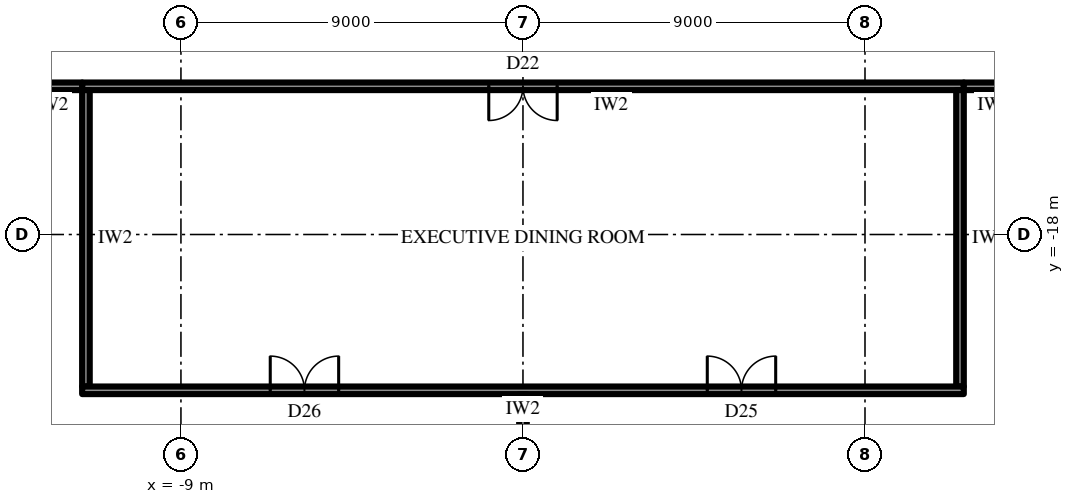
"""IFC4 building model, lengths in metres.
Left out: names, types, materials, properties, quantities, classifications, styles, units other than length and angle.
Written with IfcOpenShell. Run it as: python <this file> out.ifc"""

import sys

from ifc_helpers import new_model, si_unit, direction, frame, frame_2d, origin, place, context, subcontext, project, spatial, rectangle, extrude, element, fill, save


model = new_model("IFC4")
c1 = context("Model", 3, precision=1e-05, world=origin(), true_north=direction((0.0, 1.0)))
c2 = subcontext(c1, "Body", "Model", "MODEL_VIEW")
j1 = project(units=[si_unit("LENGTHUNIT", "METRE"), si_unit("PLANEANGLEUNIT", "RADIAN")], contexts=[c1])
p1 = place(None, origin())
s1 = spatial("IfcSite", under=j1, at=p1, CompositionType="ELEMENT")
p2 = place(p1, origin())
s2 = spatial("IfcBuilding", under=s1, at=p2, CompositionType="ELEMENT")
p3 = place(p2, frame((0.0, 0.0, 391.3)))
s3 = spatial("IfcBuildingStorey", under=s2, at=p3, CompositionType="ELEMENT", Elevation=391.3)
p4 = place(p3, frame((11.6, -14.1, 0.0), z_axis=(0.0, 0.0, 1.0), x_axis=(-1.0, 0.0, 0.0)))
e1 = element("IfcWall", 1, at=p4, inside=s3, PredefinedType="PARTITIONING", context=c2, shape_type="SweptSolid", body=[
    extrude(rectangle(XDim=23.2, YDim=0.2, at=frame_2d((11.6, 0.0))), origin(), (0.0, 0.0, 1.0), 4.7),
])
p5 = place(p4, frame((10.7, 0.0, 0.0)))
e2 = element("IfcOpeningElement", 2, at=p5, cuts=e1, PredefinedType="OPENING", context=c2, shape_type="SweptSolid", body=[
    extrude(rectangle(XDim=1.8, YDim=2.4, at=frame_2d((0.9, 1.2))), frame((0.0, 0.11, 0.0), z_axis=(0.0, -1.0, 0.0), x_axis=(1.0, 0.0, 0.0)), (0.0, 0.0, 1.0), 0.22),
])
for number, where, z_axis, x_axis in (
    (3, (11.5, -14.2, 0.0), (0.0, 0.0, 1.0), (0.0, -1.0, 0.0)),
    (4, (-11.5, -14.2, 0.0), (0.0, 0.0, 1.0), (0.0, -1.0, 0.0)),
):
    element("IfcWall", number, at=place(p3, frame(where, z_axis=z_axis, x_axis=x_axis)), inside=s3, PredefinedType="PARTITIONING", context=c2, shape_type="SweptSolid", body=[
        extrude(rectangle(XDim=7.8, YDim=0.2, at=frame_2d((3.9, 0.0))), origin(), (0.0, 0.0, 1.0), 4.7),
    ])
p6 = place(p3, frame((11.6, -22.1, 0.0), z_axis=(0.0, 0.0, 1.0), x_axis=(-1.0, 0.0, 0.0)))
e5 = element("IfcWall", 5, at=p6, inside=s3, PredefinedType="PARTITIONING", context=c2, shape_type="SweptSolid", body=[
    extrude(rectangle(XDim=23.2, YDim=0.2, at=frame_2d((11.6, 0.0))), origin(), (0.0, 0.0, 1.0), 4.7),
])
p7 = place(p6, frame((4.95, 0.0, 0.0)))
e6 = element("IfcOpeningElement", 6, at=p7, cuts=e5, PredefinedType="OPENING", context=c2, shape_type="SweptSolid", body=[
    extrude(rectangle(XDim=1.8, YDim=2.4, at=frame_2d((0.9, 1.2))), frame((0.0, 0.11, 0.0), z_axis=(0.0, -1.0, 0.0), x_axis=(1.0, 0.0, 0.0)), (0.0, 0.0, 1.0), 0.22),
])
p8 = place(p6, frame((16.45, 0.0, 0.0)))
e7 = element("IfcOpeningElement", 7, at=p8, cuts=e5, PredefinedType="OPENING", context=c2, shape_type="SweptSolid", body=[
    extrude(rectangle(XDim=1.8, YDim=2.4, at=frame_2d((0.9, 1.2))), frame((0.0, 0.11, 0.0), z_axis=(0.0, -1.0, 0.0), x_axis=(1.0, 0.0, 0.0)), (0.0, 0.0, 1.0), 0.22),
])
for number, where, z_axis, x_axis in (
    (8, (-11.6, -14.1, 0.0), (0.0, 0.0, 1.0), (-1.0, 0.0, 0.0)),
    (9, (13.225, -14.1, 0.0), (0.0, 0.0, 1.0), (-1.0, 0.0, 0.0)),
):
    element("IfcWall", number, at=place(p3, frame(where, z_axis=z_axis, x_axis=x_axis)), inside=s3, PredefinedType="PARTITIONING", context=c2, shape_type="SweptSolid", body=[
        extrude(rectangle(XDim=1.625, YDim=0.2, at=frame_2d((0.812, 0.0))), origin(), (0.0, 0.0, 1.0), 4.7),
    ])
p9 = place(p3, frame((0.0, -22.2, 0.0), z_axis=(0.0, 0.0, 1.0), x_axis=(0.0, -1.0, 0.0)))
e10 = element("IfcWall", 10, at=p9, inside=s3, PredefinedType="PARTITIONING", context=c2, shape_type="SweptSolid", body=[
    extrude(rectangle(XDim=4.36, YDim=0.2, at=frame_2d((2.18, 0.0))), origin(), (0.0, 0.0, 1.0), 3.692),
])
p10 = place(p7, frame((1.8, 0.0, 0.0), z_axis=(0.0, 0.0, 1.0), x_axis=(-1.0, 0.0, 0.0)))
e11 = element("IfcDoor", 11, at=p10, inside=s3, OperationType="DOUBLE_DOOR_SINGLE_SWING", PredefinedType="DOOR", context=c2, shape_type="SweptSolid", body=[
    extrude(rectangle(XDim=1.8, YDim=2.4, at=frame_2d((0.9, 1.2))), frame((0.0, 0.025, 0.0), z_axis=(0.0, -1.0, 0.0), x_axis=(1.0, 0.0, 0.0)), (0.0, 0.0, 1.0), 0.05),
])
fill(e6, e11)
p11 = place(p8, frame((1.8, 0.0, 0.0), z_axis=(0.0, 0.0, 1.0), x_axis=(-1.0, 0.0, 0.0)))
e12 = element("IfcDoor", 12, at=p11, inside=s3, OperationType="DOUBLE_DOOR_SINGLE_SWING", PredefinedType="DOOR", context=c2, shape_type="SweptSolid", body=[
    extrude(rectangle(XDim=1.8, YDim=2.4, at=frame_2d((0.9, 1.2))), frame((0.0, 0.025, 0.0), z_axis=(0.0, -1.0, 0.0), x_axis=(1.0, 0.0, 0.0)), (0.0, 0.0, 1.0), 0.05),
])
fill(e7, e12)
p12 = place(p5, origin())
e13 = element("IfcDoor", 13, at=p12, inside=s3, OperationType="DOUBLE_DOOR_SINGLE_SWING", PredefinedType="DOOR", context=c2, shape_type="SweptSolid", body=[
    extrude(rectangle(XDim=1.8, YDim=2.4, at=frame_2d((0.9, 1.2))), frame((0.0, 0.025, 0.0), z_axis=(0.0, -1.0, 0.0), x_axis=(1.0, 0.0, 0.0)), (0.0, 0.0, 1.0), 0.05),
])
fill(e2, e13)
save(model, sys.argv[1])
